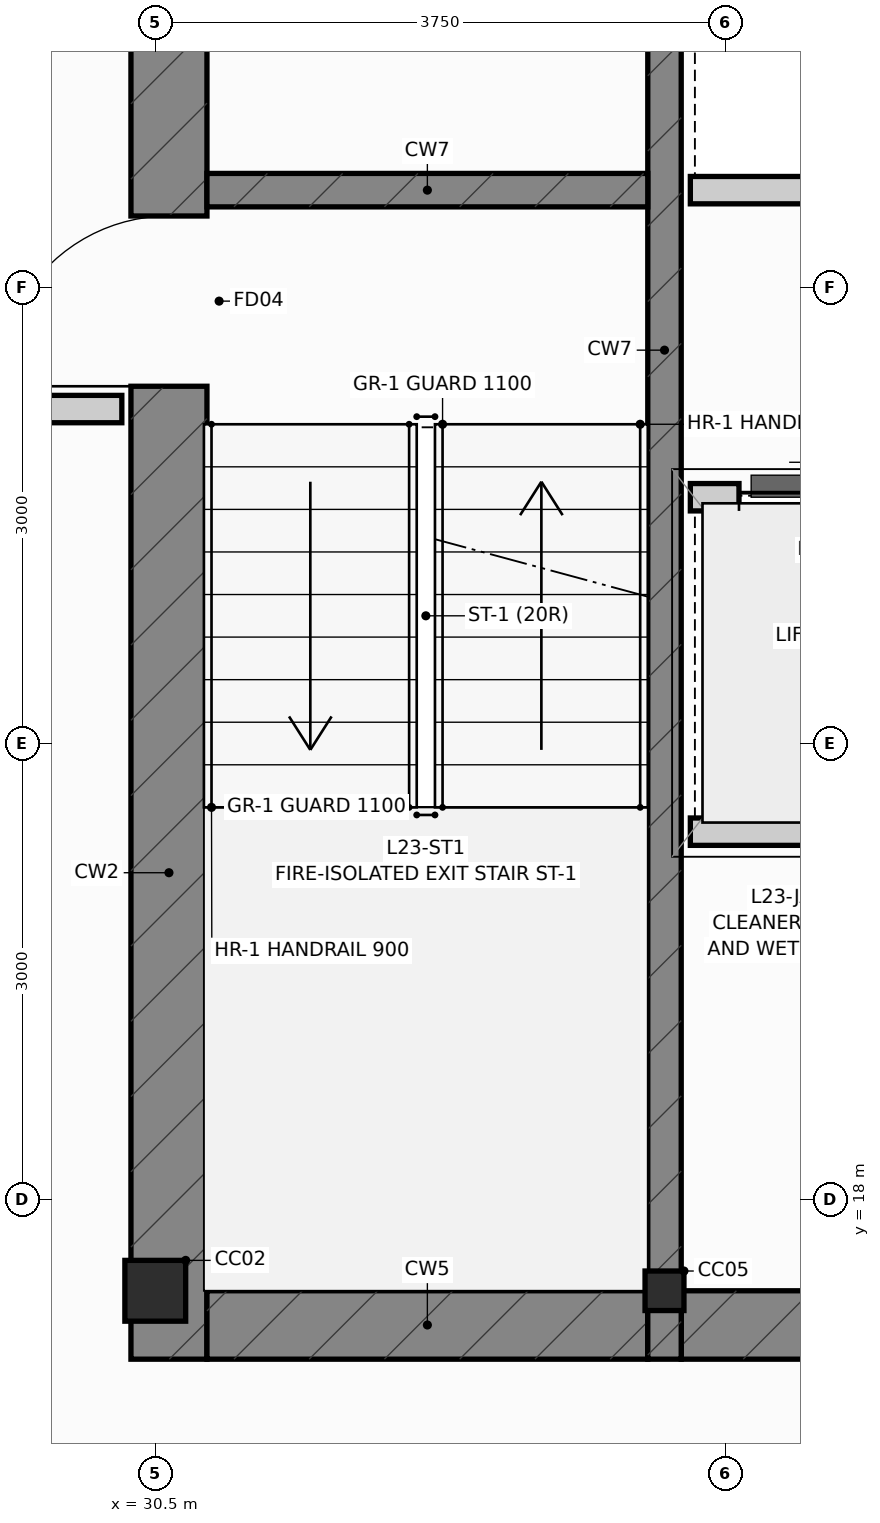
"""IFC4 building model, lengths in metres.
Left out: names, types, materials, properties, quantities, classifications, styles, units other than length and angle.
Written with IfcOpenShell. Run it as: python <this file> out.ifc"""

import sys

from ifc_helpers import new_model, si_unit, direction, frame, frame_2d, origin, origin_2d, place, context, subcontext, project, spatial, rectangle, i_section, extrude, source, transform, mapped, element, fill, save


model = new_model("IFC4")
c1 = context("Model", 3, precision=1e-05, world=origin(), true_north=direction((0.0, 1.0)))
c2 = subcontext(c1, "Body", "Model", "MODEL_VIEW")
j1 = project(units=[si_unit("LENGTHUNIT", "METRE"), si_unit("PLANEANGLEUNIT", "RADIAN")], contexts=[c1])
p1 = place(None, origin())
s1 = spatial("IfcSite", under=j1, at=p1, CompositionType="ELEMENT")
p2 = place(p1, origin())
s2 = spatial("IfcBuilding", under=s1, at=p2, CompositionType="ELEMENT")
p3 = place(p2, frame((0.0, 0.0, 112.7)))
s3 = spatial("IfcBuildingStorey", under=s2, at=p3, CompositionType="ELEMENT", Elevation=112.7)
m1 = source(origin(), c2, "Body", "SweptSolid", [
    extrude(i_section(OverallWidth=0.4, OverallDepth=0.4, WebThickness=0.02, FlangeThickness=0.032, at=origin_2d()), origin(), (0.0, 0.0, 1.0), 3.65),
])
p4 = place(p3, frame((30.5, 17.4, 0.0), z_axis=(0.0, 0.0, 1.0), x_axis=(1.0, 0.0, 0.0)))
e1 = element("IfcColumn", 1, at=p4, inside=s3, PredefinedType="COLUMN", context=c2, shape_type="MappedRepresentation", body=[
    mapped(m1, transform((0.0, 0.0, 0.0), scale=1.0)),
])
m2 = source(origin(), c2, "Body", "SweptSolid", [
    extrude(i_section(OverallWidth=0.256, OverallDepth=0.26, WebThickness=0.01, FlangeThickness=0.017, at=origin_2d()), origin(), (0.0, 0.0, 1.0), 3.65),
])
p5 = place(p3, frame((33.85, 17.4, 0.0), z_axis=(0.0, 0.0, 1.0), x_axis=(1.0, 0.0, 0.0)))
e2 = element("IfcColumn", 2, at=p5, inside=s3, PredefinedType="COLUMN", context=c2, shape_type="MappedRepresentation", body=[
    mapped(m2, transform((0.0, 0.0, 0.0), scale=1.0)),
])
p6 = place(p3, frame((30.59, 16.95, 0.0), z_axis=(0.0, 0.0, 1.0), x_axis=(0.0, 1.0, 0.0)))
e3 = element("IfcWall", 3, at=p6, inside=s3, PredefinedType="SHEAR", context=c2, shape_type="SweptSolid", body=[
    extrude(rectangle(XDim=13.275, YDim=0.5, at=frame_2d((6.638, 0.0))), origin(), (0.0, 0.0, 1.0), 3.65),
])
p7 = place(p6, frame((6.4, 0.0, 0.0)))
e4 = element("IfcOpeningElement", 4, at=p7, cuts=e3, PredefinedType="OPENING", context=c2, shape_type="SweptSolid", body=[
    extrude(rectangle(XDim=1.12, YDim=2.15, at=frame_2d((0.56, 1.075))), frame((0.0, 0.262, 0.0), z_axis=(0.0, -1.0, 0.0), x_axis=(1.0, 0.0, 0.0)), (0.0, 0.0, 1.0), 0.524),
])
p8 = place(p6, frame((10.85, 0.0, 0.0)))
e5 = element("IfcOpeningElement", 5, at=p8, cuts=e3, PredefinedType="OPENING", context=c2, shape_type="SweptSolid", body=[
    extrude(rectangle(XDim=1.2, YDim=2.2, at=frame_2d((0.6, 1.1))), frame((0.0, 0.262, 0.0), z_axis=(0.0, -1.0, 0.0), x_axis=(1.0, 0.0, 0.0)), (0.0, 0.0, 1.0), 0.524),
])
p9 = place(p3, frame((30.84, 17.175, 0.0), z_axis=(0.0, 0.0, 1.0), x_axis=(1.0, 0.0, 0.0)))
e6 = element("IfcWall", 6, at=p9, inside=s3, PredefinedType="SHEAR", context=c2, shape_type="SweptSolid", body=[
    extrude(rectangle(XDim=2.9, YDim=0.45, at=frame_2d((1.45, 0.0))), origin(), (0.0, 0.0, 1.0), 3.65),
])
p10 = place(p3, frame((33.96, 17.175, 0.0), z_axis=(0.0, 0.0, 1.0), x_axis=(1.0, 0.0, 0.0)))
e7 = element("IfcWall", 7, at=p10, inside=s3, PredefinedType="SHEAR", context=c2, shape_type="SweptSolid", body=[
    extrude(rectangle(XDim=8.08, YDim=0.45, at=frame_2d((4.04, 0.0))), origin(), (0.0, 0.0, 1.0), 3.65),
])
p11 = place(p3, frame((33.85, 16.95, 0.0), z_axis=(0.0, 0.0, 1.0), x_axis=(0.0, 1.0, 0.0)))
e8 = element("IfcWall", 8, at=p11, inside=s3, PredefinedType="SHEAR", context=c2, shape_type="SweptSolid", body=[
    extrude(rectangle(XDim=13.275, YDim=0.22, at=frame_2d((6.638, 0.0))), origin(), (0.0, 0.0, 1.0), 3.65),
])
p12 = place(p3, frame((30.84, 24.64, 0.0), z_axis=(0.0, 0.0, 1.0), x_axis=(1.0, 0.0, 0.0)))
e9 = element("IfcWall", 9, at=p12, inside=s3, PredefinedType="SHEAR", context=c2, shape_type="SweptSolid", body=[
    extrude(rectangle(XDim=2.9, YDim=0.22, at=frame_2d((1.45, 0.0))), origin(), (0.0, 0.0, 1.0), 3.65),
])
p13 = place(p3, frame((34.02, 22.62, 0.0), z_axis=(0.0, 0.0, 1.0), x_axis=(1.0, 0.0, 0.0)))
e10 = element("IfcWall", 10, at=p13, inside=s3, PredefinedType="PARTITIONING", context=c2, shape_type="SweptSolid", body=[
    extrude(rectangle(XDim=3.6, YDim=0.18, at=frame_2d((1.8, 0.0))), origin(), (0.0, 0.0, 1.0), 3.4),
])
p14 = place(p13, frame((0.32, 0.0, 0.0)))
e11 = element("IfcOpeningElement", 11, at=p14, cuts=e10, PredefinedType="OPENING", context=c2, shape_type="SweptSolid", body=[
    extrude(rectangle(XDim=1.1, YDim=2.2, at=frame_2d((0.55, 1.1))), frame((0.0, 0.102, 0.0), z_axis=(0.0, -1.0, 0.0), x_axis=(1.0, 0.0, 0.0)), (0.0, 0.0, 1.0), 0.204),
])
p15 = place(p13, frame((2.12, 0.0, 0.0)))
e12 = element("IfcOpeningElement", 12, at=p15, cuts=e10, PredefinedType="OPENING", context=c2, shape_type="SweptSolid", body=[
    extrude(rectangle(XDim=1.1, YDim=2.2, at=frame_2d((0.55, 1.1))), frame((0.0, 0.102, 0.0), z_axis=(0.0, -1.0, 0.0), x_axis=(1.0, 0.0, 0.0)), (0.0, 0.0, 1.0), 0.204),
])
p16 = place(p3, frame((34.02, 24.64, 0.0), z_axis=(0.0, 0.0, 1.0), x_axis=(1.0, 0.0, 0.0)))
e13 = element("IfcWall", 13, at=p16, inside=s3, PredefinedType="PARTITIONING", context=c2, shape_type="SweptSolid", body=[
    extrude(rectangle(XDim=3.68, YDim=0.18, at=frame_2d((1.84, 0.0))), origin(), (0.0, 0.0, 1.0), 3.4),
])
p17 = place(p3, frame((27.52, 23.2, 0.0), z_axis=(0.0, 0.0, 1.0), x_axis=(1.0, 0.0, 0.0)))
e14 = element("IfcWall", 14, at=p17, inside=s3, PredefinedType="PARTITIONING", context=c2, shape_type="SweptSolid", body=[
    extrude(rectangle(XDim=2.76, YDim=0.18, at=frame_2d((1.38, 0.0))), origin(), (0.0, 0.0, 1.0), 3.4),
])
p18 = place(p3, frame((34.02, 20.42, 0.0), z_axis=(0.0, 0.0, 1.0), x_axis=(1.0, 0.0, 0.0)))
e15 = element("IfcWall", 15, at=p18, inside=s3, PredefinedType="PARTITIONING", context=c2, shape_type="SweptSolid", body=[
    extrude(rectangle(XDim=3.64, YDim=0.18, at=frame_2d((1.82, 0.0))), origin(), (0.0, 0.0, 1.0), 3.4),
])
p19 = place(p7, origin())
e16 = element("IfcDoor", 16, at=p19, inside=s3, OperationType="SINGLE_SWING_LEFT", PredefinedType="DOOR", context=c2, shape_type="SweptSolid", body=[
    extrude(rectangle(XDim=1.12, YDim=2.15, at=frame_2d((0.56, 1.075))), frame((0.0, 0.025, 0.0), z_axis=(0.0, -1.0, 0.0), x_axis=(1.0, 0.0, 0.0)), (0.0, 0.0, 1.0), 0.05),
])
fill(e4, e16)
p20 = place(p14, origin())
e17 = element("IfcDoor", 17, at=p20, inside=s3, OperationType="SLIDING_TO_LEFT", PredefinedType="DOOR", context=c2, shape_type="SweptSolid", body=[
    extrude(rectangle(XDim=1.1, YDim=2.2, at=frame_2d((0.55, 1.1))), frame((0.0, 0.025, 0.0), z_axis=(0.0, -1.0, 0.0), x_axis=(1.0, 0.0, 0.0)), (0.0, 0.0, 1.0), 0.05),
])
fill(e11, e17)
save(model, sys.argv[1])
